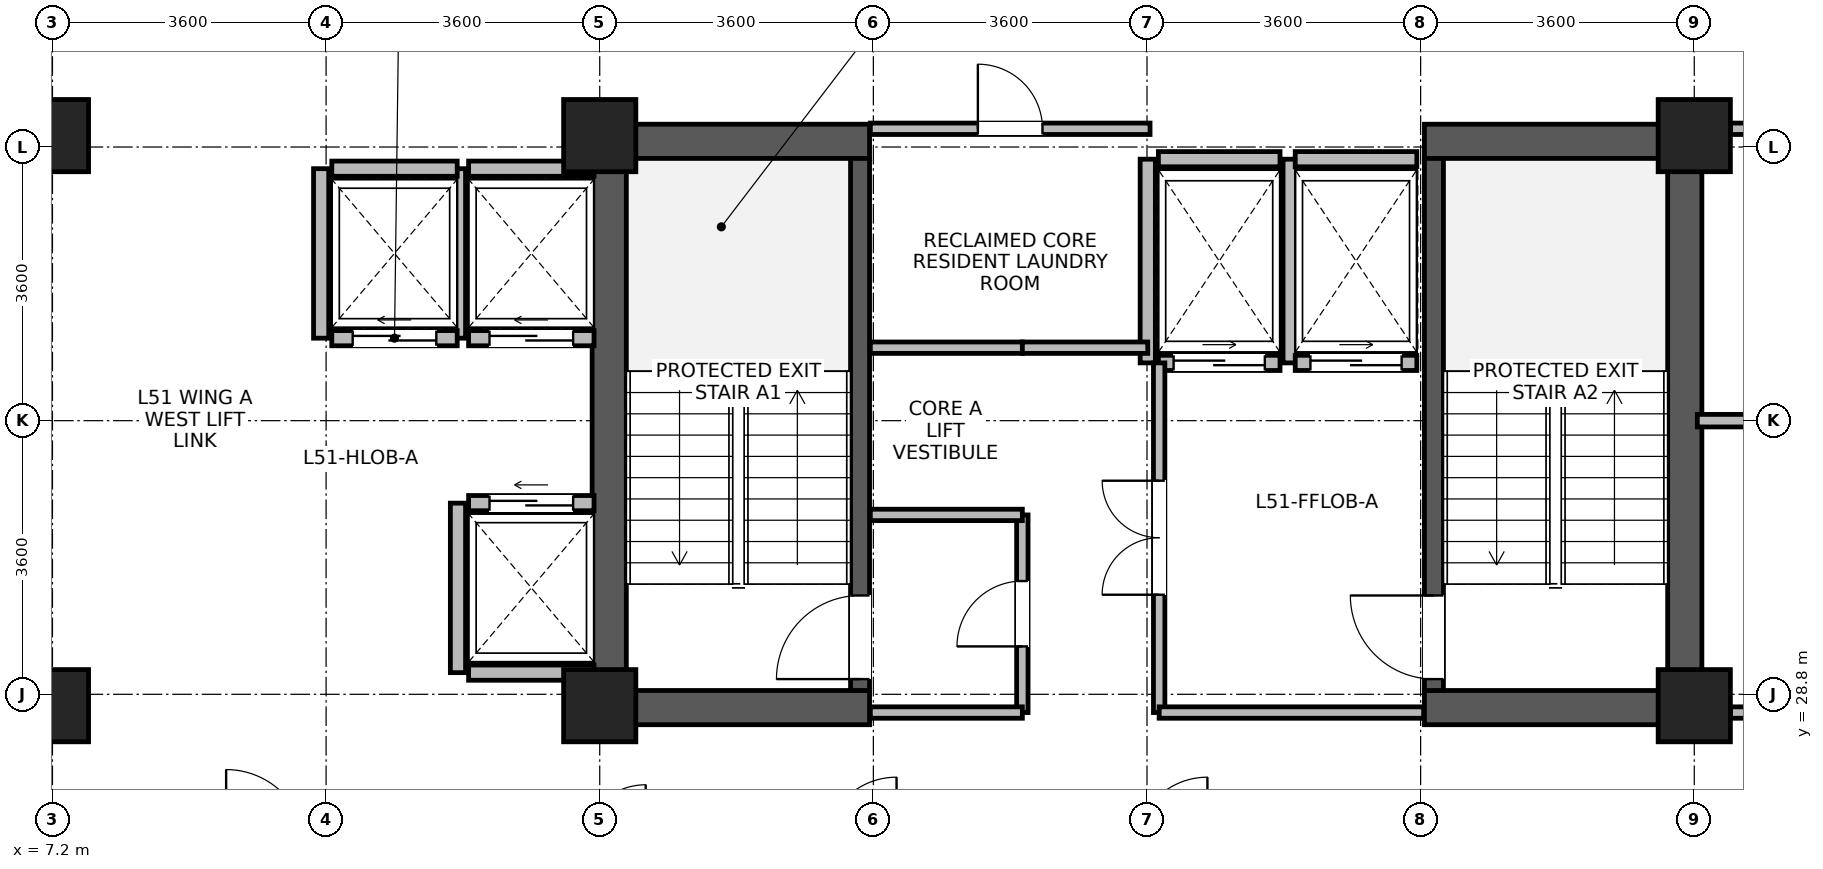
"""IFC4 building model, lengths in metres.
Left out: names, types, materials, properties, quantities, classifications, styles, units other than length and angle.
Written with IfcOpenShell. Run it as: python <this file> out.ifc"""

import sys

from ifc_helpers import new_model, si_unit, direction, frame, frame_2d, origin, origin_2d, place, context, subcontext, project, spatial, rectangle, extrude, source, transform, mapped, element, fill, save


model = new_model("IFC4")
c1 = context("Model", 3, precision=1e-05, world=origin(), true_north=direction((0.0, 1.0)))
c2 = subcontext(c1, "Body", "Model", "MODEL_VIEW")
j1 = project(units=[si_unit("LENGTHUNIT", "METRE"), si_unit("PLANEANGLEUNIT", "RADIAN")], contexts=[c1])
p1 = place(None, origin())
s1 = spatial("IfcSite", under=j1, at=p1, CompositionType="ELEMENT")
p2 = place(p1, origin())
s2 = spatial("IfcBuilding", under=s1, at=p2, CompositionType="ELEMENT")
p3 = place(p2, frame((0.0, 0.0, 201.8)))
s3 = spatial("IfcBuildingStorey", under=s2, at=p3, CompositionType="ELEMENT", Elevation=201.8)
for number, where, z_axis, x_axis in (
    (1, (14.525, 28.4, 0.0), (0.0, 0.0, 1.0), (0.0, 1.0, 0.0)),
    (2, (28.675, 28.4, 0.0), (0.0, 0.0, 1.0), (0.0, 1.0, 0.0)),
):
    element("IfcWall", number, at=place(p3, frame(where, z_axis=z_axis, x_axis=x_axis)), inside=s3, PredefinedType="SHEAR", context=c2, shape_type="SweptSolid", body=[
        extrude(rectangle(XDim=7.9, YDim=0.45, at=frame_2d((3.95, 0.0))), origin(), (0.0, 0.0, 1.0), 3.47),
    ])
for number, where, z_axis, x_axis in (
    (3, (14.75, 28.625, 0.0), (0.0, 0.0, 1.0), (1.0, 0.0, 0.0)),
    (4, (25.25, 28.625, 0.0), (0.0, 0.0, 1.0), (1.0, 0.0, 0.0)),
    (5, (14.75, 36.075, 0.0), (0.0, 0.0, 1.0), (1.0, 0.0, 0.0)),
    (6, (25.25, 36.075, 0.0), (0.0, 0.0, 1.0), (1.0, 0.0, 0.0)),
):
    element("IfcWall", number, at=place(p3, frame(where, z_axis=z_axis, x_axis=x_axis)), inside=s3, PredefinedType="SHEAR", context=c2, shape_type="SweptSolid", body=[
        extrude(rectangle(XDim=3.2, YDim=0.45, at=frame_2d((1.6, 0.0))), origin(), (0.0, 0.0, 1.0), 3.47),
    ])
p4 = place(p3, frame((17.825, 28.85, 0.0), z_axis=(0.0, 0.0, 1.0), x_axis=(0.0, 1.0, 0.0)))
e7 = element("IfcWall", 7, at=p4, inside=s3, PredefinedType="SHEAR", context=c2, shape_type="SweptSolid", body=[
    extrude(rectangle(XDim=7.0, YDim=0.25, at=frame_2d((3.5, 0.0))), origin(), (0.0, 0.0, 1.0), 3.47),
])
p5 = place(p4, frame((0.15, 0.0, 0.0)))
e8 = element("IfcOpeningElement", 8, at=p5, cuts=e7, PredefinedType="OPENING", context=c2, shape_type="SweptSolid", body=[
    extrude(rectangle(XDim=1.1, YDim=2.08, at=frame_2d((0.55, 1.04))), frame((0.0, 0.135, 0.0), z_axis=(0.0, -1.0, 0.0), x_axis=(1.0, 0.0, 0.0)), (0.0, 0.0, 1.0), 0.27),
])
p6 = place(p3, frame((25.375, 28.85, 0.0), z_axis=(0.0, 0.0, 1.0), x_axis=(0.0, 1.0, 0.0)))
e9 = element("IfcWall", 9, at=p6, inside=s3, PredefinedType="SHEAR", context=c2, shape_type="SweptSolid", body=[
    extrude(rectangle(XDim=7.0, YDim=0.25, at=frame_2d((3.5, 0.0))), origin(), (0.0, 0.0, 1.0), 3.47),
])
p7 = place(p6, frame((0.15, 0.0, 0.0)))
e10 = element("IfcOpeningElement", 10, at=p7, cuts=e9, PredefinedType="OPENING", context=c2, shape_type="SweptSolid", body=[
    extrude(rectangle(XDim=1.1, YDim=2.08, at=frame_2d((0.55, 1.04))), frame((0.0, 0.135, 0.0), z_axis=(0.0, -1.0, 0.0), x_axis=(1.0, 0.0, 0.0)), (0.0, 0.0, 1.0), 0.27),
])
m1 = source(origin(), c2, "Body", "SweptSolid", [
    extrude(rectangle(XDim=0.95, YDim=0.95, at=origin_2d()), origin(), (0.0, 0.0, 1.0), 3.7),
])
for number, where, z_axis, x_axis in (
    (11, (7.2, 28.65, 0.0), (0.0, 0.0, 1.0), (1.0, 0.0, 0.0)),
    (12, (7.2, 36.15, 0.0), (0.0, 0.0, 1.0), (1.0, 0.0, 0.0)),
    (13, (14.4, 28.65, 0.0), (0.0, 0.0, 1.0), (1.0, 0.0, 0.0)),
    (14, (14.4, 36.15, 0.0), (0.0, 0.0, 1.0), (1.0, 0.0, 0.0)),
    (15, (28.8, 28.65, 0.0), (0.0, 0.0, 1.0), (1.0, 0.0, 0.0)),
    (16, (28.8, 36.15, 0.0), (0.0, 0.0, 1.0), (1.0, 0.0, 0.0)),
):
    element("IfcColumn", number, at=place(p3, frame(where, z_axis=z_axis, x_axis=x_axis)), inside=s3, PredefinedType="COLUMN", context=c2, shape_type="MappedRepresentation", body=[
        mapped(m1, transform((0.0, 0.0, 0.0), x_axis=(1.0, 0.0, 0.0), y_axis=(0.0, 1.0, 0.0), z_axis=(0.0, 0.0, 1.0), scale=1.0)),
    ])
p8 = place(p3, frame((12.675, 33.485, 0.0), z_axis=(0.0, 0.0, 1.0), x_axis=(1.0, 0.0, 0.0)))
e17 = element("IfcWall", 17, at=p8, inside=s3, PredefinedType="PARTITIONING", context=c2, shape_type="SweptSolid", body=[
    extrude(rectangle(XDim=1.65, YDim=0.2, at=frame_2d((0.825, 0.0))), origin(), (0.0, 0.0, 1.0), 3.45),
])
p9 = place(p8, frame((0.275, 0.0, 0.0)))
e18 = element("IfcOpeningElement", 18, at=p9, cuts=e17, PredefinedType="OPENING", context=c2, shape_type="SweptSolid", body=[
    extrude(rectangle(XDim=1.1, YDim=2.12, at=frame_2d((0.55, 1.06))), frame((0.0, 0.11, 0.0), z_axis=(0.0, -1.0, 0.0), x_axis=(1.0, 0.0, 0.0)), (0.0, 0.0, 1.0), 0.22),
])
p10 = place(p3, frame((12.675, 35.715, 0.0), z_axis=(0.0, 0.0, 1.0), x_axis=(1.0, 0.0, 0.0)))
e19 = element("IfcWall", 19, at=p10, inside=s3, PredefinedType="PARTITIONING", context=c2, shape_type="SweptSolid", body=[
    extrude(rectangle(XDim=1.65, YDim=0.2, at=frame_2d((0.825, 0.0))), origin(), (0.0, 0.0, 1.0), 3.45),
])
p11 = place(p3, frame((12.535, 33.485, 0.0), z_axis=(0.0, 0.0, 1.0), x_axis=(0.0, 1.0, 0.0)))
e20 = element("IfcWall", 20, at=p11, inside=s3, PredefinedType="PARTITIONING", context=c2, shape_type="SweptSolid", body=[
    extrude(rectangle(XDim=2.23, YDim=0.2, at=frame_2d((1.115, 0.0))), origin(), (0.0, 0.0, 1.0), 3.45),
])
p12 = place(p3, frame((12.675, 29.085, 0.0), z_axis=(0.0, 0.0, 1.0), x_axis=(1.0, 0.0, 0.0)))
e21 = element("IfcWall", 21, at=p12, inside=s3, PredefinedType="PARTITIONING", context=c2, shape_type="SweptSolid", body=[
    extrude(rectangle(XDim=1.65, YDim=0.2, at=frame_2d((0.825, 0.0))), origin(), (0.0, 0.0, 1.0), 3.45),
])
p13 = place(p3, frame((12.675, 31.315, 0.0), z_axis=(0.0, 0.0, 1.0), x_axis=(1.0, 0.0, 0.0)))
e22 = element("IfcWall", 22, at=p13, inside=s3, PredefinedType="PARTITIONING", context=c2, shape_type="SweptSolid", body=[
    extrude(rectangle(XDim=1.65, YDim=0.2, at=frame_2d((0.825, 0.0))), origin(), (0.0, 0.0, 1.0), 3.45),
])
p14 = place(p13, frame((0.275, 0.0, 0.0)))
e23 = element("IfcOpeningElement", 23, at=p14, cuts=e22, PredefinedType="OPENING", context=c2, shape_type="SweptSolid", body=[
    extrude(rectangle(XDim=1.1, YDim=2.12, at=frame_2d((0.55, 1.06))), frame((0.0, 0.11, 0.0), z_axis=(0.0, -1.0, 0.0), x_axis=(1.0, 0.0, 0.0)), (0.0, 0.0, 1.0), 0.22),
])
p15 = place(p3, frame((12.535, 29.085, 0.0), z_axis=(0.0, 0.0, 1.0), x_axis=(0.0, 1.0, 0.0)))
e24 = element("IfcWall", 24, at=p15, inside=s3, PredefinedType="PARTITIONING", context=c2, shape_type="SweptSolid", body=[
    extrude(rectangle(XDim=2.23, YDim=0.2, at=frame_2d((1.115, 0.0))), origin(), (0.0, 0.0, 1.0), 3.45),
])
p16 = place(p3, frame((10.875, 33.485, 0.0), z_axis=(0.0, 0.0, 1.0), x_axis=(1.0, 0.0, 0.0)))
e25 = element("IfcWall", 25, at=p16, inside=s3, PredefinedType="PARTITIONING", context=c2, shape_type="SweptSolid", body=[
    extrude(rectangle(XDim=1.65, YDim=0.2, at=frame_2d((0.825, 0.0))), origin(), (0.0, 0.0, 1.0), 3.45),
])
p17 = place(p16, frame((0.275, 0.0, 0.0)))
e26 = element("IfcOpeningElement", 26, at=p17, cuts=e25, PredefinedType="OPENING", context=c2, shape_type="SweptSolid", body=[
    extrude(rectangle(XDim=1.1, YDim=2.12, at=frame_2d((0.55, 1.06))), frame((0.0, 0.11, 0.0), z_axis=(0.0, -1.0, 0.0), x_axis=(1.0, 0.0, 0.0)), (0.0, 0.0, 1.0), 0.22),
])
p18 = place(p3, frame((10.875, 35.715, 0.0), z_axis=(0.0, 0.0, 1.0), x_axis=(1.0, 0.0, 0.0)))
e27 = element("IfcWall", 27, at=p18, inside=s3, PredefinedType="PARTITIONING", context=c2, shape_type="SweptSolid", body=[
    extrude(rectangle(XDim=1.65, YDim=0.2, at=frame_2d((0.825, 0.0))), origin(), (0.0, 0.0, 1.0), 3.45),
])
p19 = place(p3, frame((10.735, 33.485, 0.0), z_axis=(0.0, 0.0, 1.0), x_axis=(0.0, 1.0, 0.0)))
e28 = element("IfcWall", 28, at=p19, inside=s3, PredefinedType="PARTITIONING", context=c2, shape_type="SweptSolid", body=[
    extrude(rectangle(XDim=2.23, YDim=0.2, at=frame_2d((1.115, 0.0))), origin(), (0.0, 0.0, 1.0), 3.45),
])
p20 = place(p3, frame((21.75, 33.16, 0.0), z_axis=(0.0, 0.0, 1.0), x_axis=(1.0, 0.0, 0.0)))
e29 = element("IfcWall", 29, at=p20, inside=s3, PredefinedType="PARTITIONING", context=c2, shape_type="SweptSolid", body=[
    extrude(rectangle(XDim=1.6, YDim=0.2, at=frame_2d((0.8, 0.0))), origin(), (0.0, 0.0, 1.0), 3.45),
])
p21 = place(p20, frame((0.2, 0.0, 0.0)))
e30 = element("IfcOpeningElement", 30, at=p21, cuts=e29, PredefinedType="OPENING", context=c2, shape_type="SweptSolid", body=[
    extrude(rectangle(XDim=1.2, YDim=2.12, at=frame_2d((0.6, 1.06))), frame((0.0, 0.11, 0.0), z_axis=(0.0, -1.0, 0.0), x_axis=(1.0, 0.0, 0.0)), (0.0, 0.0, 1.0), 0.22),
])
p22 = place(p3, frame((21.75, 35.84, 0.0), z_axis=(0.0, 0.0, 1.0), x_axis=(1.0, 0.0, 0.0)))
e31 = element("IfcWall", 31, at=p22, inside=s3, PredefinedType="PARTITIONING", context=c2, shape_type="SweptSolid", body=[
    extrude(rectangle(XDim=1.6, YDim=0.2, at=frame_2d((0.8, 0.0))), origin(), (0.0, 0.0, 1.0), 2.45),
])
for number, where, z_axis, x_axis in (
    (32, (21.61, 33.16, 0.0), (0.0, 0.0, 1.0), (0.0, 1.0, 0.0)),
    (33, (23.49, 33.16, 0.0), (0.0, 0.0, 1.0), (0.0, 1.0, 0.0)),
):
    element("IfcWall", number, at=place(p3, frame(where, z_axis=z_axis, x_axis=x_axis)), inside=s3, PredefinedType="PARTITIONING", context=c2, shape_type="SweptSolid", body=[
        extrude(rectangle(XDim=2.68, YDim=0.2, at=frame_2d((1.34, 0.0))), origin(), (0.0, 0.0, 1.0), 3.45),
    ])
p23 = place(p3, frame((23.55, 33.16, 0.0), z_axis=(0.0, 0.0, 1.0), x_axis=(1.0, 0.0, 0.0)))
e34 = element("IfcWall", 34, at=p23, inside=s3, PredefinedType="PARTITIONING", context=c2, shape_type="SweptSolid", body=[
    extrude(rectangle(XDim=1.6, YDim=0.2, at=frame_2d((0.8, 0.0))), origin(), (0.0, 0.0, 1.0), 3.45),
])
p24 = place(p23, frame((0.2, 0.0, 0.0)))
e35 = element("IfcOpeningElement", 35, at=p24, cuts=e34, PredefinedType="OPENING", context=c2, shape_type="SweptSolid", body=[
    extrude(rectangle(XDim=1.2, YDim=2.12, at=frame_2d((0.6, 1.06))), frame((0.0, 0.11, 0.0), z_axis=(0.0, -1.0, 0.0), x_axis=(1.0, 0.0, 0.0)), (0.0, 0.0, 1.0), 0.22),
])
p25 = place(p3, frame((23.55, 35.84, 0.0), z_axis=(0.0, 0.0, 1.0), x_axis=(1.0, 0.0, 0.0)))
e36 = element("IfcWall", 36, at=p25, inside=s3, PredefinedType="PARTITIONING", context=c2, shape_type="SweptSolid", body=[
    extrude(rectangle(XDim=1.6, YDim=0.2, at=frame_2d((0.8, 0.0))), origin(), (0.0, 0.0, 1.0), 2.45),
])
p26 = place(p3, frame((29.275, 28.56, 0.0), z_axis=(0.0, 0.0, 1.0), x_axis=(1.0, 0.0, 0.0)))
e37 = element("IfcWall", 37, at=p26, inside=s3, PredefinedType="PARTITIONING", context=c2, shape_type="SweptSolid", body=[
    extrude(rectangle(XDim=4.085, YDim=0.15, at=frame_2d((2.042, 0.0))), origin(), (0.0, 0.0, 1.0), 2.85),
])
p27 = place(p26, frame((1.613, 0.0, 0.0)))
e38 = element("IfcOpeningElement", 38, at=p27, cuts=e37, PredefinedType="OPENING", context=c2, shape_type="SweptSolid", body=[
    extrude(rectangle(XDim=0.86, YDim=2.02, at=frame_2d((0.43, 1.01))), frame((0.0, 0.085, 0.0), z_axis=(0.0, -1.0, 0.0), x_axis=(1.0, 0.0, 0.0)), (0.0, 0.0, 1.0), 0.17),
])
p28 = place(p3, frame((29.275, 36.24, 0.0), z_axis=(0.0, 0.0, 1.0), x_axis=(1.0, 0.0, 0.0)))
e39 = element("IfcWall", 39, at=p28, inside=s3, PredefinedType="PARTITIONING", context=c2, shape_type="SweptSolid", body=[
    extrude(rectangle(XDim=4.085, YDim=0.15, at=frame_2d((2.042, 0.0))), origin(), (0.0, 0.0, 1.0), 2.85),
])
p29 = place(p28, frame((1.393, 0.0, 0.0)))
e40 = element("IfcOpeningElement", 40, at=p29, cuts=e39, PredefinedType="OPENING", context=c2, shape_type="SweptSolid", body=[
    extrude(rectangle(XDim=1.3, YDim=2.12, at=frame_2d((0.65, 1.06))), frame((0.0, 0.085, 0.0), z_axis=(0.0, -1.0, 0.0), x_axis=(1.0, 0.0, 0.0)), (0.0, 0.0, 1.0), 0.17),
])
p30 = place(p3, frame((17.96, 36.24, 0.0), z_axis=(0.0, 0.0, 1.0), x_axis=(1.0, 0.0, 0.0)))
e41 = element("IfcWall", 41, at=p30, inside=s3, PredefinedType="PARTITIONING", context=c2, shape_type="SweptSolid", body=[
    extrude(rectangle(XDim=3.68, YDim=0.15, at=frame_2d((1.84, 0.0))), origin(), (0.0, 0.0, 1.0), 2.45),
])
p31 = place(p30, frame((1.415, 0.0, 0.0)))
e42 = element("IfcOpeningElement", 42, at=p31, cuts=e41, PredefinedType="OPENING", context=c2, shape_type="SweptSolid", body=[
    extrude(rectangle(XDim=0.85, YDim=2.04, at=frame_2d((0.425, 1.02))), frame((0.0, 0.085, 0.0), z_axis=(0.0, -1.0, 0.0), x_axis=(1.0, 0.0, 0.0)), (0.0, 0.0, 1.0), 0.17),
])
p32 = place(p3, frame((19.96, 28.56, 0.0), z_axis=(0.0, 0.0, 1.0), x_axis=(0.0, 1.0, 0.0)))
e43 = element("IfcWall", 43, at=p32, inside=s3, PredefinedType="PARTITIONING", context=c2, shape_type="SweptSolid", body=[
    extrude(rectangle(XDim=2.6, YDim=0.15, at=frame_2d((1.3, 0.0))), origin(), (0.0, 0.0, 1.0), 3.45),
])
p33 = place(p32, frame((0.87, 0.0, 0.0)))
e44 = element("IfcOpeningElement", 44, at=p33, cuts=e43, PredefinedType="OPENING", context=c2, shape_type="SweptSolid", body=[
    extrude(rectangle(XDim=0.86, YDim=2.02, at=frame_2d((0.43, 1.01))), frame((0.0, 0.085, 0.0), z_axis=(0.0, -1.0, 0.0), x_axis=(1.0, 0.0, 0.0)), (0.0, 0.0, 1.0), 0.17),
])
p34 = place(p3, frame((17.96, 28.56, 0.0), z_axis=(0.0, 0.0, 1.0), x_axis=(1.0, 0.0, 0.0)))
e45 = element("IfcWall", 45, at=p34, inside=s3, PredefinedType="PARTITIONING", context=c2, shape_type="SweptSolid", body=[
    extrude(rectangle(XDim=2.0, YDim=0.15, at=frame_2d((1.0, 0.0))), origin(), (0.0, 0.0, 1.0), 2.45),
])
for number, where, z_axis, x_axis in (
    (46, (17.96, 31.16, 0.0), (0.0, 0.0, 1.0), (1.0, 0.0, 0.0)),
    (47, (17.96, 33.36, 0.0), (0.0, 0.0, 1.0), (1.0, 0.0, 0.0)),
):
    element("IfcWall", number, at=place(p3, frame(where, z_axis=z_axis, x_axis=x_axis)), inside=s3, PredefinedType="PARTITIONING", context=c2, shape_type="SweptSolid", body=[
        extrude(rectangle(XDim=2.0, YDim=0.15, at=frame_2d((1.0, 0.0))), origin(), (0.0, 0.0, 1.0), 3.45),
    ])
p35 = place(p3, frame((19.96, 33.36, 0.0), z_axis=(0.0, 0.0, 1.0), x_axis=(1.0, 0.0, 0.0)))
e48 = element("IfcWall", 48, at=p35, inside=s3, PredefinedType="PARTITIONING", context=c2, shape_type="SweptSolid", body=[
    extrude(rectangle(XDim=1.65, YDim=0.15, at=frame_2d((0.825, 0.0))), origin(), (0.0, 0.0, 1.0), 3.45),
])
p36 = place(p3, frame((21.76, 28.56, 0.0), z_axis=(0.0, 0.0, 1.0), x_axis=(0.0, 1.0, 0.0)))
e49 = element("IfcWall", 49, at=p36, inside=s3, PredefinedType="PARTITIONING", context=c2, shape_type="SweptSolid", body=[
    extrude(rectangle(XDim=4.6, YDim=0.15, at=frame_2d((2.3, 0.0))), origin(), (0.0, 0.0, 1.0), 3.45),
])
p37 = place(p36, frame((1.55, 0.0, 0.0)))
e50 = element("IfcOpeningElement", 50, at=p37, cuts=e49, PredefinedType="OPENING", context=c2, shape_type="SweptSolid", body=[
    extrude(rectangle(XDim=1.5, YDim=2.1, at=frame_2d((0.75, 1.05))), frame((0.0, 0.085, 0.0), z_axis=(0.0, -1.0, 0.0), x_axis=(1.0, 0.0, 0.0)), (0.0, 0.0, 1.0), 0.17),
])
p38 = place(p3, frame((28.84, 32.4, 0.0), z_axis=(0.0, 0.0, 1.0), x_axis=(1.0, 0.0, 0.0)))
e51 = element("IfcWall", 51, at=p38, inside=s3, PredefinedType="PARTITIONING", context=c2, shape_type="SweptSolid", body=[
    extrude(rectangle(XDim=4.52, YDim=0.165, at=frame_2d((2.26, 0.0))), origin(), (0.0, 0.0, 1.0), 3.45),
])
p39 = place(p3, frame((21.76, 28.56, 0.0), z_axis=(0.0, 0.0, 1.0), x_axis=(1.0, 0.0, 0.0)))
e52 = element("IfcWall", 52, at=p39, inside=s3, PredefinedType="PARTITIONING", context=c2, shape_type="SweptSolid", body=[
    extrude(rectangle(XDim=3.48, YDim=0.15, at=frame_2d((1.74, 0.0))), origin(), (0.0, 0.0, 1.0), 2.45),
])
p40 = place(p5, origin())
e53 = element("IfcDoor", 53, at=p40, inside=s3, OperationType="SINGLE_SWING_LEFT", PredefinedType="DOOR", context=c2, shape_type="SweptSolid", body=[
    extrude(rectangle(XDim=1.1, YDim=2.08, at=frame_2d((0.55, 1.04))), frame((0.0, 0.025, 0.0), z_axis=(0.0, -1.0, 0.0), x_axis=(1.0, 0.0, 0.0)), (0.0, 0.0, 1.0), 0.05),
])
fill(e8, e53)
p41 = place(p7, origin())
e54 = element("IfcDoor", 54, at=p41, inside=s3, OperationType="SINGLE_SWING_RIGHT", PredefinedType="DOOR", context=c2, shape_type="SweptSolid", body=[
    extrude(rectangle(XDim=1.1, YDim=2.08, at=frame_2d((0.55, 1.04))), frame((0.0, 0.025, 0.0), z_axis=(0.0, -1.0, 0.0), x_axis=(1.0, 0.0, 0.0)), (0.0, 0.0, 1.0), 0.05),
])
fill(e10, e54)
p42 = place(p9, origin())
e55 = element("IfcDoor", 55, at=p42, inside=s3, OperationType="SLIDING_TO_LEFT", PredefinedType="DOOR", context=c2, shape_type="SweptSolid", body=[
    extrude(rectangle(XDim=1.1, YDim=2.12, at=frame_2d((0.55, 1.06))), frame((0.0, 0.025, 0.0), z_axis=(0.0, -1.0, 0.0), x_axis=(1.0, 0.0, 0.0)), (0.0, 0.0, 1.0), 0.05),
])
fill(e18, e55)
p43 = place(p14, origin())
e56 = element("IfcDoor", 56, at=p43, inside=s3, OperationType="SLIDING_TO_LEFT", PredefinedType="DOOR", context=c2, shape_type="SweptSolid", body=[
    extrude(rectangle(XDim=1.1, YDim=2.12, at=frame_2d((0.55, 1.06))), frame((0.0, 0.025, 0.0), z_axis=(0.0, -1.0, 0.0), x_axis=(1.0, 0.0, 0.0)), (0.0, 0.0, 1.0), 0.05),
])
fill(e23, e56)
p44 = place(p17, origin())
e57 = element("IfcDoor", 57, at=p44, inside=s3, OperationType="SLIDING_TO_LEFT", PredefinedType="DOOR", context=c2, shape_type="SweptSolid", body=[
    extrude(rectangle(XDim=1.1, YDim=2.12, at=frame_2d((0.55, 1.06))), frame((0.0, 0.025, 0.0), z_axis=(0.0, -1.0, 0.0), x_axis=(1.0, 0.0, 0.0)), (0.0, 0.0, 1.0), 0.05),
])
fill(e26, e57)
p45 = place(p21, origin())
e58 = element("IfcDoor", 58, at=p45, inside=s3, OperationType="SLIDING_TO_RIGHT", PredefinedType="DOOR", context=c2, shape_type="SweptSolid", body=[
    extrude(rectangle(XDim=1.2, YDim=2.12, at=frame_2d((0.6, 1.06))), frame((0.0, 0.025, 0.0), z_axis=(0.0, -1.0, 0.0), x_axis=(1.0, 0.0, 0.0)), (0.0, 0.0, 1.0), 0.05),
])
fill(e30, e58)
p46 = place(p24, origin())
e59 = element("IfcDoor", 59, at=p46, inside=s3, OperationType="SLIDING_TO_RIGHT", PredefinedType="DOOR", context=c2, shape_type="SweptSolid", body=[
    extrude(rectangle(XDim=1.2, YDim=2.12, at=frame_2d((0.6, 1.06))), frame((0.0, 0.025, 0.0), z_axis=(0.0, -1.0, 0.0), x_axis=(1.0, 0.0, 0.0)), (0.0, 0.0, 1.0), 0.05),
])
fill(e35, e59)
p47 = place(p31, origin())
e60 = element("IfcDoor", 60, at=p47, inside=s3, OperationType="SINGLE_SWING_LEFT", PredefinedType="DOOR", context=c2, shape_type="SweptSolid", body=[
    extrude(rectangle(XDim=0.85, YDim=2.04, at=frame_2d((0.425, 1.02))), frame((0.0, 0.025, 0.0), z_axis=(0.0, -1.0, 0.0), x_axis=(1.0, 0.0, 0.0)), (0.0, 0.0, 1.0), 0.05),
])
fill(e42, e60)
p48 = place(p33, origin())
e61 = element("IfcDoor", 61, at=p48, inside=s3, OperationType="SINGLE_SWING_LEFT", PredefinedType="DOOR", context=c2, shape_type="SweptSolid", body=[
    extrude(rectangle(XDim=0.86, YDim=2.02, at=frame_2d((0.43, 1.01))), frame((0.0, 0.025, 0.0), z_axis=(0.0, -1.0, 0.0), x_axis=(1.0, 0.0, 0.0)), (0.0, 0.0, 1.0), 0.05),
])
fill(e44, e61)
p49 = place(p37, origin())
e62 = element("IfcDoor", 62, at=p49, inside=s3, OperationType="DOUBLE_DOOR_SINGLE_SWING", PredefinedType="DOOR", context=c2, shape_type="SweptSolid", body=[
    extrude(rectangle(XDim=1.5, YDim=2.1, at=frame_2d((0.75, 1.05))), frame((0.0, 0.025, 0.0), z_axis=(0.0, -1.0, 0.0), x_axis=(1.0, 0.0, 0.0)), (0.0, 0.0, 1.0), 0.05),
])
fill(e50, e62)
save(model, sys.argv[1])
